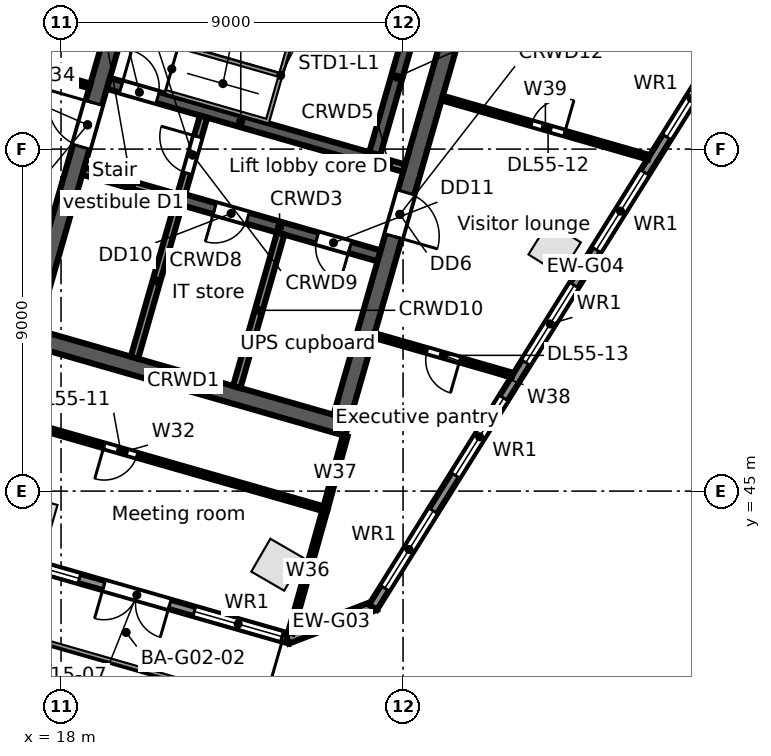
"""IFC4 building model, lengths in metres.
Left out: names, types, materials, properties, quantities, classifications, styles, units other than length and angle.
Written with IfcOpenShell. Run it as: python <this file> out.ifc"""

import sys

from ifc_helpers import new_model, si_unit, direction, frame, frame_2d, origin, origin_2d, place, context, subcontext, project, spatial, rectangle, extrude, element, fill, save


model = new_model("IFC4")
c1 = context("Model", 3, precision=1e-05, world=origin(), true_north=direction((0.0, 1.0)))
c2 = subcontext(c1, "Body", "Model", "MODEL_VIEW")
j1 = project(units=[si_unit("LENGTHUNIT", "METRE"), si_unit("PLANEANGLEUNIT", "RADIAN")], contexts=[c1])
p1 = place(None, origin())
s1 = spatial("IfcSite", under=j1, at=p1, CompositionType="ELEMENT")
p2 = place(p1, origin())
s2 = spatial("IfcBuilding", under=s1, at=p2, CompositionType="ELEMENT")
p3 = place(p2, frame((0.0, 0.0, 250.4)))
s3 = spatial("IfcBuildingStorey", under=s2, at=p3, CompositionType="ELEMENT", Elevation=250.4)
for number, where, z_axis, x_axis in (
    (1, (17.288, 44.291, 0.0), (0.0, 0.0, 1.0), (0.961, -0.276, 0.0)),
    (2, (23.69, 43.063, 0.0), (0.0, 0.0, 1.0), (-0.865, 0.501, 0.0)),
    (3, (30.99, 51.386, 0.0), (0.0, 0.0, 1.0), (0.53, 0.848, 0.0)),
):
    element("IfcColumn", number, at=place(p3, frame(where, z_axis=z_axis, x_axis=x_axis)), inside=s3, PredefinedType="COLUMN", context=c2, shape_type="SweptSolid", body=[
        extrude(rectangle(XDim=1.0, YDim=1.0, at=origin_2d()), origin(), (0.0, 0.0, 1.0), 3.9),
    ])
p4 = place(p3, frame((24.034, 41.108, 0.0), z_axis=(0.0, 0.0, 1.0), x_axis=(-0.96126060691, 0.275641153683, 0.0)))
e4 = element("IfcWall", 4, at=p4, inside=s3, PredefinedType="STANDARD", context=c2, shape_type="SweptSolid", body=[
    extrude(rectangle(XDim=24.951, YDim=0.25, at=frame_2d((12.475, 0.0))), origin(), (0.0, 0.0, 1.0), 3.62),
])
p5 = place(p4, frame((22.416, 0.0, 0.8)))
e5 = element("IfcOpeningElement", 5, at=p5, cuts=e4, PredefinedType="OPENING", context=c2, shape_type="SweptSolid", body=[
    extrude(rectangle(XDim=2.4, YDim=2.2, at=frame_2d((1.2, 1.1))), frame((0.0, 0.135, 0.0), z_axis=(0.0, -1.0, 0.0), x_axis=(1.0, 0.0, 0.0)), (0.0, 0.0, 1.0), 0.27),
])
p6 = place(p4, frame((19.643, 0.0, 0.8)))
e6 = element("IfcOpeningElement", 6, at=p6, cuts=e4, PredefinedType="OPENING", context=c2, shape_type="SweptSolid", body=[
    extrude(rectangle(XDim=2.4, YDim=2.2, at=frame_2d((1.2, 1.1))), frame((0.0, 0.135, 0.0), z_axis=(0.0, -1.0, 0.0), x_axis=(1.0, 0.0, 0.0)), (0.0, 0.0, 1.0), 0.27),
])
p7 = place(p4, frame((16.869, 0.0, 0.8)))
e7 = element("IfcOpeningElement", 7, at=p7, cuts=e4, PredefinedType="OPENING", context=c2, shape_type="SweptSolid", body=[
    extrude(rectangle(XDim=2.4, YDim=2.2, at=frame_2d((1.2, 1.1))), frame((0.0, 0.135, 0.0), z_axis=(0.0, -1.0, 0.0), x_axis=(1.0, 0.0, 0.0)), (0.0, 0.0, 1.0), 0.27),
])
p8 = place(p4, frame((14.096, 0.0, 0.8)))
e8 = element("IfcOpeningElement", 8, at=p8, cuts=e4, PredefinedType="OPENING", context=c2, shape_type="SweptSolid", body=[
    extrude(rectangle(XDim=2.4, YDim=2.2, at=frame_2d((1.2, 1.1))), frame((0.0, 0.135, 0.0), z_axis=(0.0, -1.0, 0.0), x_axis=(1.0, 0.0, 0.0)), (0.0, 0.0, 1.0), 0.27),
])
p9 = place(p4, frame((11.622, 0.0, 0.0)))
e9 = element("IfcOpeningElement", 9, at=p9, cuts=e4, PredefinedType="OPENING", context=c2, shape_type="SweptSolid", body=[
    extrude(rectangle(XDim=1.8, YDim=2.4, at=frame_2d((0.9, 1.2))), frame((0.0, 0.135, 0.0), z_axis=(0.0, -1.0, 0.0), x_axis=(1.0, 0.0, 0.0)), (0.0, 0.0, 1.0), 0.27),
])
p10 = place(p4, frame((8.549, 0.0, 0.8)))
e10 = element("IfcOpeningElement", 10, at=p10, cuts=e4, PredefinedType="OPENING", context=c2, shape_type="SweptSolid", body=[
    extrude(rectangle(XDim=2.4, YDim=2.2, at=frame_2d((1.2, 1.1))), frame((0.0, 0.135, 0.0), z_axis=(0.0, -1.0, 0.0), x_axis=(1.0, 0.0, 0.0)), (0.0, 0.0, 1.0), 0.27),
])
p11 = place(p4, frame((5.775, 0.0, 0.8)))
e11 = element("IfcOpeningElement", 11, at=p11, cuts=e4, PredefinedType="OPENING", context=c2, shape_type="SweptSolid", body=[
    extrude(rectangle(XDim=2.4, YDim=2.2, at=frame_2d((1.2, 1.1))), frame((0.0, 0.135, 0.0), z_axis=(0.0, -1.0, 0.0), x_axis=(1.0, 0.0, 0.0)), (0.0, 0.0, 1.0), 0.27),
])
p12 = place(p4, frame((3.302, 0.0, 0.0)))
e12 = element("IfcOpeningElement", 12, at=p12, cuts=e4, PredefinedType="OPENING", context=c2, shape_type="SweptSolid", body=[
    extrude(rectangle(XDim=1.8, YDim=2.4, at=frame_2d((0.9, 1.2))), frame((0.0, 0.135, 0.0), z_axis=(0.0, -1.0, 0.0), x_axis=(1.0, 0.0, 0.0)), (0.0, 0.0, 1.0), 0.27),
])
p13 = place(p4, frame((0.229, 0.0, 0.8)))
e13 = element("IfcOpeningElement", 13, at=p13, cuts=e4, PredefinedType="OPENING", context=c2, shape_type="SweptSolid", body=[
    extrude(rectangle(XDim=2.4, YDim=2.2, at=frame_2d((1.2, 1.1))), frame((0.0, 0.135, 0.0), z_axis=(0.0, -1.0, 0.0), x_axis=(1.0, 0.0, 0.0)), (0.0, 0.0, 1.0), 0.27),
])
p14 = place(p3, frame((26.27, 41.993, 0.0), z_axis=(0.0, 0.0, 1.0), x_axis=(-0.933573798066, -0.358385216722, 0.0)))
e14 = element("IfcWall", 14, at=p14, inside=s3, PredefinedType="STANDARD", context=c2, shape_type="SweptSolid", body=[
    extrude(rectangle(XDim=2.48, YDim=0.25, at=frame_2d((1.24, 0.0))), origin(), (0.0, 0.0, 1.0), 3.62),
])
p15 = place(p3, frame((37.392, 59.84, 0.0), z_axis=(0.0, 0.0, 1.0), x_axis=(-0.529919909431, -0.848047692992, 0.0)))
e15 = element("IfcWall", 15, at=p15, inside=s3, PredefinedType="STANDARD", context=c2, shape_type="SweptSolid", body=[
    extrude(rectangle(XDim=21.104, YDim=0.25, at=frame_2d((10.552, 0.0))), origin(), (0.0, 0.0, 1.0), 3.62),
])
p16 = place(p15, frame((18.112, 0.0, 0.8)))
e16 = element("IfcOpeningElement", 16, at=p16, cuts=e15, PredefinedType="OPENING", context=c2, shape_type="SweptSolid", body=[
    extrude(rectangle(XDim=2.4, YDim=2.2, at=frame_2d((1.2, 1.1))), frame((0.0, 0.135, 0.0), z_axis=(0.0, -1.0, 0.0), x_axis=(1.0, 0.0, 0.0)), (0.0, 0.0, 1.0), 0.27),
])
p17 = place(p15, frame((14.612, 0.0, 0.8)))
e17 = element("IfcOpeningElement", 17, at=p17, cuts=e15, PredefinedType="OPENING", context=c2, shape_type="SweptSolid", body=[
    extrude(rectangle(XDim=2.4, YDim=2.2, at=frame_2d((1.2, 1.1))), frame((0.0, 0.135, 0.0), z_axis=(0.0, -1.0, 0.0), x_axis=(1.0, 0.0, 0.0)), (0.0, 0.0, 1.0), 0.27),
])
p18 = place(p15, frame((11.112, 0.0, 0.8)))
e18 = element("IfcOpeningElement", 18, at=p18, cuts=e15, PredefinedType="OPENING", context=c2, shape_type="SweptSolid", body=[
    extrude(rectangle(XDim=2.4, YDim=2.2, at=frame_2d((1.2, 1.1))), frame((0.0, 0.135, 0.0), z_axis=(0.0, -1.0, 0.0), x_axis=(1.0, 0.0, 0.0)), (0.0, 0.0, 1.0), 0.27),
])
p19 = place(p15, frame((7.612, 0.0, 0.8)))
e19 = element("IfcOpeningElement", 19, at=p19, cuts=e15, PredefinedType="OPENING", context=c2, shape_type="SweptSolid", body=[
    extrude(rectangle(XDim=2.4, YDim=2.2, at=frame_2d((1.2, 1.1))), frame((0.0, 0.135, 0.0), z_axis=(0.0, -1.0, 0.0), x_axis=(1.0, 0.0, 0.0)), (0.0, 0.0, 1.0), 0.27),
])
p20 = place(p15, frame((4.112, 0.0, 0.8)))
e20 = element("IfcOpeningElement", 20, at=p20, cuts=e15, PredefinedType="OPENING", context=c2, shape_type="SweptSolid", body=[
    extrude(rectangle(XDim=2.4, YDim=2.2, at=frame_2d((1.2, 1.1))), frame((0.0, 0.135, 0.0), z_axis=(0.0, -1.0, 0.0), x_axis=(1.0, 0.0, 0.0)), (0.0, 0.0, 1.0), 0.27),
])
p21 = place(p15, frame((0.612, 0.0, 0.8)))
e21 = element("IfcOpeningElement", 21, at=p21, cuts=e15, PredefinedType="OPENING", context=c2, shape_type="SweptSolid", body=[
    extrude(rectangle(XDim=2.4, YDim=2.2, at=frame_2d((1.2, 1.1))), frame((0.0, 0.135, 0.0), z_axis=(0.0, -1.0, 0.0), x_axis=(1.0, 0.0, 0.0)), (0.0, 0.0, 1.0), 0.27),
])
p22 = place(p3, frame((16.89, 49.149, 0.0), z_axis=(0.0, 0.0, 1.0), x_axis=(0.96126248289, -0.275634611374, 0.0)))
e22 = element("IfcWall", 22, at=p22, inside=s3, PredefinedType="SOLIDWALL", context=c2, shape_type="SweptSolid", body=[
    extrude(rectangle(XDim=9.0, YDim=0.45, at=frame_2d((4.5, 0.0))), origin(), (0.0, 0.0, 1.0), 3.62),
])
p23 = place(p3, frame((18.583, 53.423, 0.0), z_axis=(0.0, 0.0, 1.0), x_axis=(0.961259287968, -0.275645753268, 0.0)))
e23 = element("IfcWall", 23, at=p23, inside=s3, PredefinedType="SOLIDWALL", context=c2, shape_type="SweptSolid", body=[
    extrude(rectangle(XDim=2.65, YDim=0.2, at=frame_2d((1.325, 0.0))), origin(), (0.0, 0.0, 1.0), 3.62),
])
p24 = place(p3, frame((21.131, 52.692, 0.0), z_axis=(0.0, 0.0, 1.0), x_axis=(0.961261488075, -0.275638080722, 0.0)))
e24 = element("IfcWall", 24, at=p24, inside=s3, PredefinedType="SOLIDWALL", context=c2, shape_type="SweptSolid", body=[
    extrude(rectangle(XDim=5.45, YDim=0.3, at=frame_2d((2.725, 0.0))), origin(), (0.0, 0.0, 1.0), 3.62),
])
p25 = place(p24, frame((0.95, 0.0, 0.0)))
e25 = element("IfcOpeningElement", 25, at=p25, cuts=e24, PredefinedType="OPENING", context=c2, shape_type="SweptSolid", body=[
    extrude(rectangle(XDim=0.9, YDim=2.1, at=frame_2d((0.45, 1.05))), frame((0.0, 0.16, 0.0), z_axis=(0.0, -1.0, 0.0), x_axis=(1.0, 0.0, 0.0)), (0.0, 0.0, 1.0), 0.32),
])
p26 = place(p24, frame((3.75, 0.0, 0.0)))
e26 = element("IfcOpeningElement", 26, at=p26, cuts=e24, PredefinedType="OPENING", context=c2, shape_type="SweptSolid", body=[
    extrude(rectangle(XDim=0.9, YDim=2.1, at=frame_2d((0.45, 1.05))), frame((0.0, 0.16, 0.0), z_axis=(0.0, -1.0, 0.0), x_axis=(1.0, 0.0, 0.0)), (0.0, 0.0, 1.0), 0.32),
])
p27 = place(p3, frame((19.245, 55.73, 0.0), z_axis=(0.0, 0.0, 1.0), x_axis=(0.961263007877, -0.275632780503, 0.0)))
e27 = element("IfcWall", 27, at=p27, inside=s3, PredefinedType="SOLIDWALL", context=c2, shape_type="SweptSolid", body=[
    extrude(rectangle(XDim=7.25, YDim=0.3, at=frame_2d((3.625, 0.0))), origin(), (0.0, 0.0, 1.0), 3.62),
])
p28 = place(p27, frame((0.35, 0.0, 0.0)))
e28 = element("IfcOpeningElement", 28, at=p28, cuts=e27, PredefinedType="OPENING", context=c2, shape_type="SweptSolid", body=[
    extrude(rectangle(XDim=1.0, YDim=2.1, at=frame_2d((0.5, 1.05))), frame((0.0, 0.16, 0.0), z_axis=(0.0, -1.0, 0.0), x_axis=(1.0, 0.0, 0.0)), (0.0, 0.0, 1.0), 0.32),
])
p29 = place(p3, frame((26.214, 53.732, 0.0), z_axis=(0.0, 0.0, 1.0), x_axis=(0.961241665642, -0.275707200184, 0.0)))
e29 = element("IfcWall", 29, at=p29, inside=s3, PredefinedType="SOLIDWALL", context=c2, shape_type="SweptSolid", body=[
    extrude(rectangle(XDim=0.85, YDim=0.2, at=frame_2d((0.425, 0.0))), origin(), (0.0, 0.0, 1.0), 3.62),
])
p30 = place(p3, frame((17.168, 49.303, 0.0), z_axis=(0.0, 0.0, 1.0), x_axis=(0.275638974822, 0.961261231695, 0.0)))
e30 = element("IfcWall", 30, at=p30, inside=s3, PredefinedType="SOLIDWALL", context=c2, shape_type="SweptSolid", body=[
    extrude(rectangle(XDim=11.1, YDim=0.45, at=frame_2d((5.55, 0.0))), origin(), (0.0, 0.0, 1.0), 3.62),
])
p31 = place(p30, frame((4.95, 0.0, 0.0)))
e31 = element("IfcOpeningElement", 31, at=p31, cuts=e30, PredefinedType="OPENING", context=c2, shape_type="SweptSolid", body=[
    extrude(rectangle(XDim=1.2, YDim=2.1, at=frame_2d((0.6, 1.05))), frame((0.0, 0.235, 0.0), z_axis=(0.0, -1.0, 0.0), x_axis=(1.0, 0.0, 0.0)), (0.0, 0.0, 1.0), 0.47),
])
p32 = place(p3, frame((19.932, 48.511, 0.0), z_axis=(0.0, 0.0, 1.0), x_axis=(0.275642273411, 0.961260285827, 0.0)))
e32 = element("IfcWall", 32, at=p32, inside=s3, PredefinedType="SOLIDWALL", context=c2, shape_type="SweptSolid", body=[
    extrude(rectangle(XDim=4.2, YDim=0.2, at=frame_2d((2.1, 0.0))), origin(), (0.0, 0.0, 1.0), 3.62),
])
p33 = place(p3, frame((21.172, 52.837, 0.0), z_axis=(0.0, 0.0, 1.0), x_axis=(0.275657676022, 0.961255868981, 0.0)))
e33 = element("IfcWall", 33, at=p33, inside=s3, PredefinedType="PARTITIONING", context=c2, shape_type="SweptSolid", body=[
    extrude(rectangle(XDim=2.1, YDim=0.2, at=frame_2d((1.05, 0.0))), origin(), (0.0, 0.0, 1.0), 3.62),
])
p34 = place(p33, frame((0.55, 0.0, 0.0)))
e34 = element("IfcOpeningElement", 34, at=p34, cuts=e33, PredefinedType="OPENING", context=c2, shape_type="SweptSolid", body=[
    extrude(rectangle(XDim=1.0, YDim=2.1, at=frame_2d((0.5, 1.05))), frame((0.0, 0.11, 0.0), z_axis=(0.0, -1.0, 0.0), x_axis=(1.0, 0.0, 0.0)), (0.0, 0.0, 1.0), 0.22),
])
p35 = place(p3, frame((22.623, 47.739, 0.0), z_axis=(0.0, 0.0, 1.0), x_axis=(0.275642273411, 0.961260285827, 0.0)))
e35 = element("IfcWall", 35, at=p35, inside=s3, PredefinedType="PARTITIONING", context=c2, shape_type="SweptSolid", body=[
    extrude(rectangle(XDim=4.2, YDim=0.2, at=frame_2d((2.1, 0.0))), origin(), (0.0, 0.0, 1.0), 3.62),
])
p36 = place(p3, frame((26.256, 53.876, 0.0), z_axis=(0.0, 0.0, 1.0), x_axis=(0.275588560745, 0.96127568636, 0.0)))
e36 = element("IfcWall", 36, at=p36, inside=s3, PredefinedType="SOLIDWALL", context=c2, shape_type="SweptSolid", body=[
    extrude(rectangle(XDim=4.2, YDim=0.3, at=frame_2d((2.1, 0.0))), origin(), (0.0, 0.0, 1.0), 3.62),
])
p37 = place(p3, frame((25.387, 46.947, 0.0), z_axis=(0.0, 0.0, 1.0), x_axis=(0.275638974822, 0.961261231695, 0.0)))
e37 = element("IfcWall", 37, at=p37, inside=s3, PredefinedType="SOLIDWALL", context=c2, shape_type="SweptSolid", body=[
    extrude(rectangle(XDim=11.1, YDim=0.45, at=frame_2d((5.55, 0.0))), origin(), (0.0, 0.0, 1.0), 3.62),
])
p38 = place(p37, frame((4.95, 0.0, 0.0)))
e38 = element("IfcOpeningElement", 38, at=p38, cuts=e37, PredefinedType="OPENING", context=c2, shape_type="SweptSolid", body=[
    extrude(rectangle(XDim=1.2, YDim=2.1, at=frame_2d((0.6, 1.05))), frame((0.0, 0.235, 0.0), z_axis=(0.0, -1.0, 0.0), x_axis=(1.0, 0.0, 0.0)), (0.0, 0.0, 1.0), 0.47),
])
p39 = place(p3, frame((14.377, 47.555, 0.0), z_axis=(0.0, 0.0, 1.0), x_axis=(0.961263044958, -0.275632651182, 0.0)))
e39 = element("IfcWall", 39, at=p39, inside=s3, PredefinedType="PARTITIONING", context=c2, shape_type="SweptSolid", body=[
    extrude(rectangle(XDim=11.0, YDim=0.125, at=frame_2d((5.5, 0.0))), origin(), (0.0, 0.0, 1.0), 2.9),
])
p40 = place(p39, frame((4.95, 0.0, 0.0)))
e40 = element("IfcOpeningElement", 40, at=p40, cuts=e39, PredefinedType="OPENING", context=c2, shape_type="SweptSolid", body=[
    extrude(rectangle(XDim=0.9, YDim=2.1, at=frame_2d((0.45, 1.05))), frame((0.0, 0.073, 0.0), z_axis=(0.0, -1.0, 0.0), x_axis=(1.0, 0.0, 0.0)), (0.0, 0.0, 1.0), 0.145),
])
p41 = place(p3, frame((16.857, 56.206, 0.0), z_axis=(0.0, 0.0, 1.0), x_axis=(0.961383985066, -0.275210525341, 0.0)))
e41 = element("IfcWall", 41, at=p41, inside=s3, PredefinedType="PARTITIONING", context=c2, shape_type="SweptSolid", body=[
    extrude(rectangle(XDim=1.977, YDim=0.125, at=frame_2d((0.988, 0.0))), origin(), (0.0, 0.0, 1.0), 3.62),
])
p42 = place(p3, frame((24.036, 41.27, 0.0), z_axis=(0.0, 0.0, 1.0), x_axis=(0.270787421954, 0.962639170256, 0.0)))
e42 = element("IfcWall", 42, at=p42, inside=s3, PredefinedType="PARTITIONING", context=c2, shape_type="SweptSolid", body=[
    extrude(rectangle(XDim=3.379, YDim=0.125, at=frame_2d((1.689, 0.0))), origin(), (0.0, 0.0, 1.0), 2.9),
])
p43 = place(p3, frame((24.951, 44.523, 0.0), z_axis=(0.0, 0.0, 1.0), x_axis=(0.264046927145, 0.964509834198, 0.0)))
e43 = element("IfcWall", 43, at=p43, inside=s3, PredefinedType="PARTITIONING", context=c2, shape_type="SweptSolid", body=[
    extrude(rectangle(XDim=2.0, YDim=0.125, at=frame_2d((1.0, 0.0))), origin(), (0.0, 0.0, 1.0), 2.9),
])
p44 = place(p3, frame((26.237, 49.096, 0.0), z_axis=(0.0, 0.0, 1.0), x_axis=(0.961285271066, -0.275555126304, 0.0)))
e44 = element("IfcWall", 44, at=p44, inside=s3, PredefinedType="PARTITIONING", context=c2, shape_type="SweptSolid", body=[
    extrude(rectangle(XDim=3.789, YDim=0.125, at=frame_2d((1.894, 0.0))), origin(), (0.0, 0.0, 1.0), 2.9),
])
p45 = place(p44, frame((1.45, 0.0, 0.0)))
e45 = element("IfcOpeningElement", 45, at=p45, cuts=e44, PredefinedType="OPENING", context=c2, shape_type="SweptSolid", body=[
    extrude(rectangle(XDim=0.9, YDim=2.1, at=frame_2d((0.45, 1.05))), frame((0.0, 0.073, 0.0), z_axis=(0.0, -1.0, 0.0), x_axis=(1.0, 0.0, 0.0)), (0.0, 0.0, 1.0), 0.145),
])
p46 = place(p3, frame((28.029, 55.344, 0.0), z_axis=(0.0, 0.0, 1.0), x_axis=(0.961249621014, -0.275679462603, 0.0)))
e46 = element("IfcWall", 46, at=p46, inside=s3, PredefinedType="PARTITIONING", context=c2, shape_type="SweptSolid", body=[
    extrude(rectangle(XDim=5.652, YDim=0.125, at=frame_2d((2.826, 0.0))), origin(), (0.0, 0.0, 1.0), 2.988),
])
p47 = place(p46, frame((2.45, 0.0, 0.0)))
e47 = element("IfcOpeningElement", 47, at=p47, cuts=e46, PredefinedType="OPENING", context=c2, shape_type="SweptSolid", body=[
    extrude(rectangle(XDim=0.9, YDim=2.1, at=frame_2d((0.45, 1.05))), frame((0.0, 0.073, 0.0), z_axis=(0.0, -1.0, 0.0), x_axis=(1.0, 0.0, 0.0)), (0.0, 0.0, 1.0), 0.145),
])
p48 = place(p11, origin())
e48 = element("IfcWindow", 48, at=p48, inside=s3, PartitioningType="SINGLE_PANEL", PredefinedType="WINDOW", context=c2, shape_type="SweptSolid", body=[
    extrude(rectangle(XDim=2.4, YDim=2.2, at=frame_2d((1.2, 1.1))), frame((0.0, 0.03, 0.0), z_axis=(0.0, -1.0, 0.0), x_axis=(1.0, 0.0, 0.0)), (0.0, 0.0, 1.0), 0.06),
])
fill(e11, e48)
p49 = place(p12, origin())
e49 = element("IfcDoor", 49, at=p49, inside=s3, OperationType="DOUBLE_DOOR_SINGLE_SWING", PredefinedType="DOOR", context=c2, shape_type="SweptSolid", body=[
    extrude(rectangle(XDim=1.8, YDim=2.4, at=frame_2d((0.9, 1.2))), frame((0.0, 0.025, 0.0), z_axis=(0.0, -1.0, 0.0), x_axis=(1.0, 0.0, 0.0)), (0.0, 0.0, 1.0), 0.05),
])
fill(e12, e49)
p50 = place(p13, origin())
e50 = element("IfcWindow", 50, at=p50, inside=s3, PartitioningType="SINGLE_PANEL", PredefinedType="WINDOW", context=c2, shape_type="SweptSolid", body=[
    extrude(rectangle(XDim=2.4, YDim=2.2, at=frame_2d((1.2, 1.1))), frame((0.0, 0.03, 0.0), z_axis=(0.0, -1.0, 0.0), x_axis=(1.0, 0.0, 0.0)), (0.0, 0.0, 1.0), 0.06),
])
fill(e13, e50)
p51 = place(p16, origin())
e51 = element("IfcWindow", 51, at=p51, inside=s3, PartitioningType="SINGLE_PANEL", PredefinedType="WINDOW", context=c2, shape_type="SweptSolid", body=[
    extrude(rectangle(XDim=2.4, YDim=2.2, at=frame_2d((1.2, 1.1))), frame((0.0, 0.03, 0.0), z_axis=(0.0, -1.0, 0.0), x_axis=(1.0, 0.0, 0.0)), (0.0, 0.0, 1.0), 0.06),
])
fill(e16, e51)
p52 = place(p17, origin())
e52 = element("IfcWindow", 52, at=p52, inside=s3, PartitioningType="SINGLE_PANEL", PredefinedType="WINDOW", context=c2, shape_type="SweptSolid", body=[
    extrude(rectangle(XDim=2.4, YDim=2.2, at=frame_2d((1.2, 1.1))), frame((0.0, 0.03, 0.0), z_axis=(0.0, -1.0, 0.0), x_axis=(1.0, 0.0, 0.0)), (0.0, 0.0, 1.0), 0.06),
])
fill(e17, e52)
p53 = place(p18, origin())
e53 = element("IfcWindow", 53, at=p53, inside=s3, PartitioningType="SINGLE_PANEL", PredefinedType="WINDOW", context=c2, shape_type="SweptSolid", body=[
    extrude(rectangle(XDim=2.4, YDim=2.2, at=frame_2d((1.2, 1.1))), frame((0.0, 0.03, 0.0), z_axis=(0.0, -1.0, 0.0), x_axis=(1.0, 0.0, 0.0)), (0.0, 0.0, 1.0), 0.06),
])
fill(e18, e53)
p54 = place(p19, origin())
e54 = element("IfcWindow", 54, at=p54, inside=s3, PartitioningType="SINGLE_PANEL", PredefinedType="WINDOW", context=c2, shape_type="SweptSolid", body=[
    extrude(rectangle(XDim=2.4, YDim=2.2, at=frame_2d((1.2, 1.1))), frame((0.0, 0.03, 0.0), z_axis=(0.0, -1.0, 0.0), x_axis=(1.0, 0.0, 0.0)), (0.0, 0.0, 1.0), 0.06),
])
fill(e19, e54)
p55 = place(p20, origin())
e55 = element("IfcWindow", 55, at=p55, inside=s3, PartitioningType="SINGLE_PANEL", PredefinedType="WINDOW", context=c2, shape_type="SweptSolid", body=[
    extrude(rectangle(XDim=2.4, YDim=2.2, at=frame_2d((1.2, 1.1))), frame((0.0, 0.03, 0.0), z_axis=(0.0, -1.0, 0.0), x_axis=(1.0, 0.0, 0.0)), (0.0, 0.0, 1.0), 0.06),
])
fill(e20, e55)
p56 = place(p28, origin())
e56 = element("IfcDoor", 56, at=p56, inside=s3, OperationType="SINGLE_SWING_LEFT", PredefinedType="DOOR", context=c2, shape_type="SweptSolid", body=[
    extrude(rectangle(XDim=1.0, YDim=2.1, at=frame_2d((0.5, 1.05))), frame((0.0, 0.025, 0.0), z_axis=(0.0, -1.0, 0.0), x_axis=(1.0, 0.0, 0.0)), (0.0, 0.0, 1.0), 0.05),
])
fill(e28, e56)
p57 = place(p34, origin())
e57 = element("IfcDoor", 57, at=p57, inside=s3, OperationType="SINGLE_SWING_RIGHT", PredefinedType="DOOR", context=c2, shape_type="SweptSolid", body=[
    extrude(rectangle(XDim=1.0, YDim=2.1, at=frame_2d((0.5, 1.05))), frame((0.0, 0.025, 0.0), z_axis=(0.0, -1.0, 0.0), x_axis=(1.0, 0.0, 0.0)), (0.0, 0.0, 1.0), 0.05),
])
fill(e34, e57)
p58 = place(p31, origin())
e58 = element("IfcDoor", 58, at=p58, inside=s3, OperationType="SINGLE_SWING_RIGHT", PredefinedType="DOOR", context=c2, shape_type="SweptSolid", body=[
    extrude(rectangle(XDim=1.2, YDim=2.1, at=frame_2d((0.6, 1.05))), frame((0.0, 0.025, 0.0), z_axis=(0.0, -1.0, 0.0), x_axis=(1.0, 0.0, 0.0)), (0.0, 0.0, 1.0), 0.05),
])
fill(e31, e58)
p59 = place(p38, frame((1.2, 0.0, 0.0), z_axis=(0.0, 0.0, 1.0), x_axis=(-1.0, 0.0, 0.0)))
e59 = element("IfcDoor", 59, at=p59, inside=s3, OperationType="SINGLE_SWING_RIGHT", PredefinedType="DOOR", context=c2, shape_type="SweptSolid", body=[
    extrude(rectangle(XDim=1.2, YDim=2.1, at=frame_2d((0.6, 1.05))), frame((0.0, 0.025, 0.0), z_axis=(0.0, -1.0, 0.0), x_axis=(1.0, 0.0, 0.0)), (0.0, 0.0, 1.0), 0.05),
])
fill(e38, e59)
p60 = place(p25, frame((0.9, 0.0, 0.0), z_axis=(0.0, 0.0, 1.0), x_axis=(-1.0, 0.0, 0.0)))
e60 = element("IfcDoor", 60, at=p60, inside=s3, OperationType="SINGLE_SWING_RIGHT", PredefinedType="DOOR", context=c2, shape_type="SweptSolid", body=[
    extrude(rectangle(XDim=0.9, YDim=2.1, at=frame_2d((0.45, 1.05))), frame((0.0, 0.025, 0.0), z_axis=(0.0, -1.0, 0.0), x_axis=(1.0, 0.0, 0.0)), (0.0, 0.0, 1.0), 0.05),
])
fill(e25, e60)
p61 = place(p26, frame((0.9, 0.0, 0.0), z_axis=(0.0, 0.0, 1.0), x_axis=(-1.0, 0.0, 0.0)))
e61 = element("IfcDoor", 61, at=p61, inside=s3, OperationType="SINGLE_SWING_LEFT", PredefinedType="DOOR", context=c2, shape_type="SweptSolid", body=[
    extrude(rectangle(XDim=0.9, YDim=2.1, at=frame_2d((0.45, 1.05))), frame((0.0, 0.025, 0.0), z_axis=(0.0, -1.0, 0.0), x_axis=(1.0, 0.0, 0.0)), (0.0, 0.0, 1.0), 0.05),
])
fill(e26, e61)
p62 = place(p40, frame((0.9, 0.0, 0.0), z_axis=(0.0, 0.0, 1.0), x_axis=(-1.0, 0.0, 0.0)))
e62 = element("IfcDoor", 62, at=p62, inside=s3, OperationType="SINGLE_SWING_RIGHT", PredefinedType="DOOR", context=c2, shape_type="SweptSolid", body=[
    extrude(rectangle(XDim=0.9, YDim=2.1, at=frame_2d((0.45, 1.05))), frame((0.0, 0.025, 0.0), z_axis=(0.0, -1.0, 0.0), x_axis=(1.0, 0.0, 0.0)), (0.0, 0.0, 1.0), 0.05),
])
fill(e40, e62)
p63 = place(p47, origin())
e63 = element("IfcDoor", 63, at=p63, inside=s3, OperationType="SINGLE_SWING_RIGHT", PredefinedType="DOOR", context=c2, shape_type="SweptSolid", body=[
    extrude(rectangle(XDim=0.9, YDim=2.1, at=frame_2d((0.45, 1.05))), frame((0.0, 0.025, 0.0), z_axis=(0.0, -1.0, 0.0), x_axis=(1.0, 0.0, 0.0)), (0.0, 0.0, 1.0), 0.05),
])
fill(e47, e63)
p64 = place(p45, frame((0.9, 0.0, 0.0), z_axis=(0.0, 0.0, 1.0), x_axis=(-1.0, 0.0, 0.0)))
e64 = element("IfcDoor", 64, at=p64, inside=s3, OperationType="SINGLE_SWING_LEFT", PredefinedType="DOOR", context=c2, shape_type="SweptSolid", body=[
    extrude(rectangle(XDim=0.9, YDim=2.1, at=frame_2d((0.45, 1.05))), frame((0.0, 0.025, 0.0), z_axis=(0.0, -1.0, 0.0), x_axis=(1.0, 0.0, 0.0)), (0.0, 0.0, 1.0), 0.05),
])
fill(e45, e64)
save(model, sys.argv[1])
